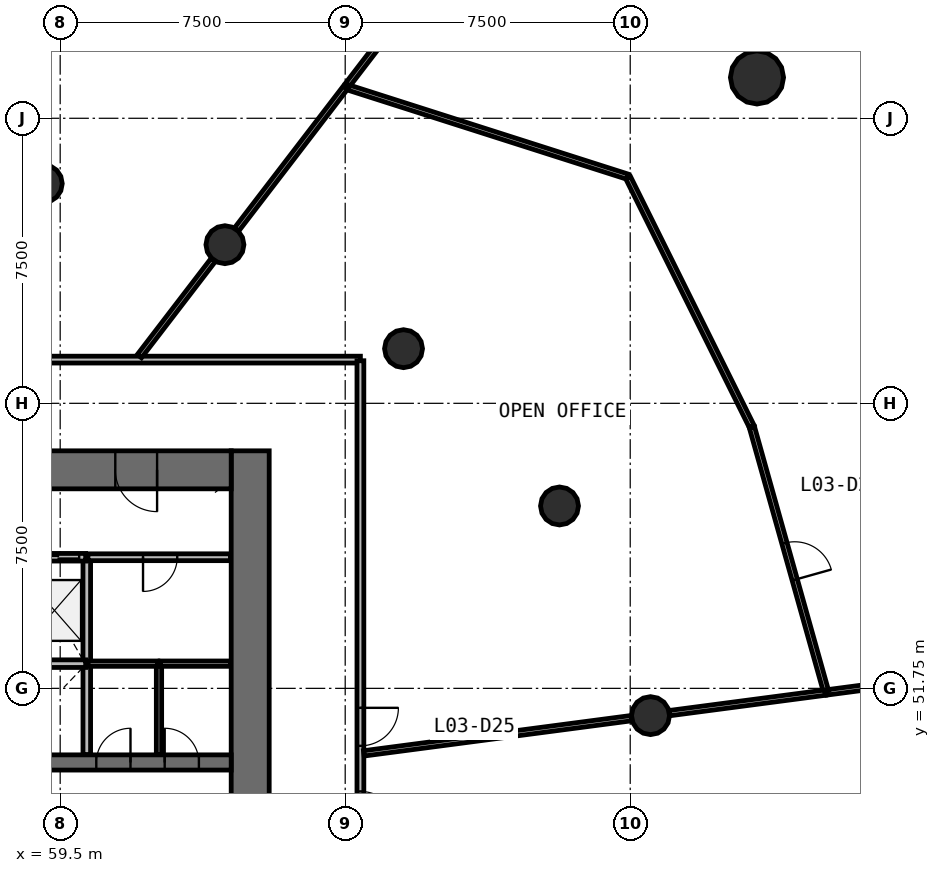
"""IFC4 building model, lengths in metres.
Left out: names, types, materials, properties, quantities, classifications, styles, units other than length and angle.
Written with IfcOpenShell. Run it as: python <this file> out.ifc"""

import sys

from ifc_helpers import new_model, si_unit, direction, frame, frame_2d, origin, origin_2d, place, context, subcontext, project, spatial, rectangle, circle, extrude, source, transform, mapped, element, fill, save


model = new_model("IFC4")
c1 = context("Model", 3, precision=1e-05, world=origin(), true_north=direction((0.0, 1.0)))
c2 = subcontext(c1, "Body", "Model", "MODEL_VIEW")
j1 = project(units=[si_unit("LENGTHUNIT", "METRE"), si_unit("PLANEANGLEUNIT", "RADIAN")], contexts=[c1])
p1 = place(None, origin())
s1 = spatial("IfcSite", under=j1, at=p1, CompositionType="ELEMENT")
p2 = place(p1, origin())
s2 = spatial("IfcBuilding", under=s1, at=p2, CompositionType="ELEMENT")
p3 = place(p2, frame((0.0, 0.0, 13.8)))
s3 = spatial("IfcBuildingStorey", under=s2, at=p3, CompositionType="ELEMENT", Elevation=13.8)
p4 = place(p3, frame((64.5, 38.0, 0.0), z_axis=(0.0, 0.0, 1.0), x_axis=(0.0, 1.0, 0.0)))
e1 = element("IfcWall", 1, at=p4, inside=s3, PredefinedType="SHEAR", context=c2, shape_type="SweptSolid", body=[
    extrude(rectangle(XDim=20.0, YDim=1.0, at=frame_2d((10.0, 0.0))), origin(), (0.0, 0.0, 1.0), 4.4),
])
p5 = place(p4, frame((9.1, 0.0, 0.0)))
e2 = element("IfcOpeningElement", 2, at=p5, cuts=e1, PredefinedType="OPENING", context=c2, shape_type="SweptSolid", body=[
    extrude(rectangle(XDim=1.8, YDim=2.1, at=frame_2d((0.9, 1.05))), frame((0.0, 0.51, 0.0), z_axis=(0.0, -1.0, 0.0), x_axis=(1.0, 0.0, 0.0)), (0.0, 0.0, 1.0), 1.02),
])
p6 = place(p3, frame((64.0, 57.5, 0.0), z_axis=(0.0, 0.0, 1.0), x_axis=(-1.0, 0.0, 0.0)))
e3 = element("IfcWall", 3, at=p6, inside=s3, PredefinedType="SHEAR", context=c2, shape_type="SweptSolid", body=[
    extrude(rectangle(XDim=24.0, YDim=1.0, at=frame_2d((12.0, 0.0))), origin(), (0.0, 0.0, 1.0), 4.4),
])
p7 = place(p6, frame((21.45, 0.0, 0.0)))
e4 = element("IfcOpeningElement", 4, at=p7, cuts=e3, PredefinedType="OPENING", context=c2, shape_type="SweptSolid", body=[
    extrude(rectangle(XDim=1.1, YDim=2.1, at=frame_2d((0.55, 1.05))), frame((0.0, 0.51, 0.0), z_axis=(0.0, -1.0, 0.0), x_axis=(1.0, 0.0, 0.0)), (0.0, 0.0, 1.0), 1.02),
])
p8 = place(p6, frame((1.95, 0.0, 0.0)))
e5 = element("IfcOpeningElement", 5, at=p8, cuts=e3, PredefinedType="OPENING", context=c2, shape_type="SweptSolid", body=[
    extrude(rectangle(XDim=1.1, YDim=2.1, at=frame_2d((0.55, 1.05))), frame((0.0, 0.51, 0.0), z_axis=(0.0, -1.0, 0.0), x_axis=(1.0, 0.0, 0.0)), (0.0, 0.0, 1.0), 1.02),
])
p9 = place(p3, frame((40.0, 49.8, 0.0), z_axis=(0.0, 0.0, 1.0), x_axis=(1.0, 0.0, 0.0)))
e6 = element("IfcWall", 6, at=p9, inside=s3, PredefinedType="SHEAR", context=c2, shape_type="SweptSolid", body=[
    extrude(rectangle(XDim=24.0, YDim=0.4, at=frame_2d((12.0, 0.0))), origin(), (0.0, 0.0, 1.0), 4.4),
])
p10 = place(p9, frame((4.5, 0.0, 0.0)))
e7 = element("IfcOpeningElement", 7, at=p10, cuts=e6, PredefinedType="OPENING", context=c2, shape_type="SweptSolid", body=[
    extrude(rectangle(XDim=1.1, YDim=2.1, at=frame_2d((0.55, 1.05))), frame((0.0, 0.21, 0.0), z_axis=(0.0, -1.0, 0.0), x_axis=(1.0, 0.0, 0.0)), (0.0, 0.0, 1.0), 0.42),
])
p11 = place(p9, frame((7.0, 0.0, 0.0)))
e8 = element("IfcOpeningElement", 8, at=p11, cuts=e6, PredefinedType="OPENING", context=c2, shape_type="SweptSolid", body=[
    extrude(rectangle(XDim=1.1, YDim=2.1, at=frame_2d((0.55, 1.05))), frame((0.0, 0.21, 0.0), z_axis=(0.0, -1.0, 0.0), x_axis=(1.0, 0.0, 0.0)), (0.0, 0.0, 1.0), 0.42),
])
p12 = place(p9, frame((9.5, 0.0, 0.0)))
e9 = element("IfcOpeningElement", 9, at=p12, cuts=e6, PredefinedType="OPENING", context=c2, shape_type="SweptSolid", body=[
    extrude(rectangle(XDim=1.1, YDim=2.1, at=frame_2d((0.55, 1.05))), frame((0.0, 0.21, 0.0), z_axis=(0.0, -1.0, 0.0), x_axis=(1.0, 0.0, 0.0)), (0.0, 0.0, 1.0), 0.42),
])
p13 = place(p9, frame((0.9, 0.0, 0.0)))
e10 = element("IfcOpeningElement", 10, at=p13, cuts=e6, PredefinedType="OPENING", context=c2, shape_type="SweptSolid", body=[
    extrude(rectangle(XDim=1.8, YDim=2.4, at=frame_2d((0.9, 1.2))), frame((0.0, 0.21, 0.0), z_axis=(0.0, -1.0, 0.0), x_axis=(1.0, 0.0, 0.0)), (0.0, 0.0, 1.0), 0.42),
])
p14 = place(p9, frame((20.45, 0.0, 0.0)))
e11 = element("IfcOpeningElement", 11, at=p14, cuts=e6, PredefinedType="OPENING", context=c2, shape_type="SweptSolid", body=[
    extrude(rectangle(XDim=0.9, YDim=2.1, at=frame_2d((0.45, 1.05))), frame((0.0, 0.21, 0.0), z_axis=(0.0, -1.0, 0.0), x_axis=(1.0, 0.0, 0.0)), (0.0, 0.0, 1.0), 0.42),
])
p15 = place(p9, frame((22.25, 0.0, 0.0)))
e12 = element("IfcOpeningElement", 12, at=p15, cuts=e6, PredefinedType="OPENING", context=c2, shape_type="SweptSolid", body=[
    extrude(rectangle(XDim=0.9, YDim=2.1, at=frame_2d((0.45, 1.05))), frame((0.0, 0.21, 0.0), z_axis=(0.0, -1.0, 0.0), x_axis=(1.0, 0.0, 0.0)), (0.0, 0.0, 1.0), 0.42),
])
p16 = place(p9, frame((11.65, 0.0, 0.0)))
e13 = element("IfcOpeningElement", 13, at=p16, cuts=e6, PredefinedType="OPENING", context=c2, shape_type="SweptSolid", body=[
    extrude(rectangle(XDim=0.9, YDim=2.1, at=frame_2d((0.45, 1.05))), frame((0.0, 0.21, 0.0), z_axis=(0.0, -1.0, 0.0), x_axis=(1.0, 0.0, 0.0)), (0.0, 0.0, 1.0), 0.42),
])
m1 = source(origin(), c2, "Body", "SweptSolid", [
    extrude(circle(Radius=0.7, at=origin_2d()), origin(), (0.0, 0.0, 1.0), 4.4),
])
p17 = place(p3, frame((77.836, 67.824, 0.0), z_axis=(0.0, 0.0, 1.0), x_axis=(1.0, 0.0, 0.0)))
e14 = element("IfcColumn", 14, at=p17, inside=s3, PredefinedType="COLUMN", context=c2, shape_type="MappedRepresentation", body=[
    mapped(m1, transform((0.0, 0.0, 0.0), scale=1.0)),
])
m2 = source(origin(), c2, "Body", "SweptSolid", [
    extrude(circle(Radius=0.5, at=origin_2d()), origin(), (0.0, 0.0, 1.0), 4.4),
])
for number, where, z_axis, x_axis in (
    (15, (75.034, 51.032, 0.0), (0.0, 0.0, 1.0), (1.0, 0.0, 0.0)),
    (16, (72.639, 56.549, 0.0), (0.0, 0.0, 1.0), (1.0, 0.0, 0.0)),
    (17, (68.535, 60.688, 0.0), (0.0, 0.0, 1.0), (1.0, 0.0, 0.0)),
    (18, (63.835, 63.424, 0.0), (0.0, 0.0, 1.0), (1.0, 0.0, 0.0)),
    (19, (59.055, 65.031, 0.0), (0.0, 0.0, 1.0), (1.0, 0.0, 0.0)),
):
    element("IfcColumn", number, at=place(p3, frame(where, z_axis=z_axis, x_axis=x_axis)), inside=s3, PredefinedType="COLUMN", context=c2, shape_type="MappedRepresentation", body=[
        mapped(m2, transform((0.0, 0.0, 0.0), scale=1.0)),
    ])
p18 = place(p3, frame((60.2, 52.4, 0.0), z_axis=(0.0, 0.0, 1.0), x_axis=(0.0, 1.0, 0.0)))
e20 = element("IfcWall", 20, at=p18, inside=s3, PredefinedType="SOLIDWALL", context=c2, shape_type="SweptSolid", body=[
    extrude(rectangle(XDim=2.8, YDim=0.2, at=frame_2d((1.4, 0.0))), origin(), (0.0, 0.0, 1.0), 4.05),
])
p19 = place(p3, frame((60.2, 50.01, 0.0), z_axis=(0.0, 0.0, 1.0), x_axis=(0.0, 1.0, 0.0)))
e21 = element("IfcWall", 21, at=p19, inside=s3, PredefinedType="SOLIDWALL", context=c2, shape_type="SweptSolid", body=[
    extrude(rectangle(XDim=2.36, YDim=0.2, at=frame_2d((1.18, 0.0))), origin(), (0.0, 0.0, 1.0), 4.05),
])
p20 = place(p3, frame((60.17, 52.4, 0.0), z_axis=(0.0, 0.0, 1.0), x_axis=(-1.0, 0.0, 0.0)))
e22 = element("IfcWall", 22, at=p20, inside=s3, PredefinedType="SOLIDWALL", context=c2, shape_type="SweptSolid", body=[
    extrude(rectangle(XDim=1.64, YDim=0.2, at=frame_2d((0.82, 0.0))), origin(), (0.0, 0.0, 1.0), 4.05),
])
p21 = place(p3, frame((60.17, 55.2, 0.0), z_axis=(0.0, 0.0, 1.0), x_axis=(-1.0, 0.0, 0.0)))
e23 = element("IfcWall", 23, at=p21, inside=s3, PredefinedType="SOLIDWALL", context=c2, shape_type="SweptSolid", body=[
    extrude(rectangle(XDim=1.64, YDim=0.2, at=frame_2d((0.82, 0.0))), origin(), (0.0, 0.0, 1.0), 4.05),
])
p22 = place(p21, frame((0.17, 0.0, 0.0)))
e24 = element("IfcOpeningElement", 24, at=p22, cuts=e23, PredefinedType="OPENING", context=c2, shape_type="SweptSolid", body=[
    extrude(rectangle(XDim=1.1, YDim=2.1, at=frame_2d((0.55, 1.05))), frame((0.0, 0.11, 0.0), z_axis=(0.0, -1.0, 0.0), x_axis=(1.0, 0.0, 0.0)), (0.0, 0.0, 1.0), 0.22),
])
p23 = place(p3, frame((36.6, 60.4, 0.0), z_axis=(0.0, 0.0, 1.0), x_axis=(1.0, 0.0, 0.0)))
e25 = element("IfcWall", 25, at=p23, inside=s3, PredefinedType="PARTITIONING", context=c2, shape_type="SweptSolid", body=[
    extrude(rectangle(XDim=30.8, YDim=0.18, at=frame_2d((15.4, 0.0))), origin(), (0.0, 0.0, 1.0), 3.25),
])
p24 = place(p23, frame((17.35, 0.0, 0.0)))
e26 = element("IfcOpeningElement", 26, at=p24, cuts=e25, PredefinedType="OPENING", context=c2, shape_type="SweptSolid", body=[
    extrude(rectangle(XDim=1.0, YDim=2.1, at=frame_2d((0.5, 1.05))), frame((0.0, 0.1, 0.0), z_axis=(0.0, -1.0, 0.0), x_axis=(1.0, 0.0, 0.0)), (0.0, 0.0, 1.0), 0.2),
])
p25 = place(p23, frame((14.85, 0.0, 0.0)))
e27 = element("IfcOpeningElement", 27, at=p25, cuts=e25, PredefinedType="OPENING", context=c2, shape_type="SweptSolid", body=[
    extrude(rectangle(XDim=0.9, YDim=2.1, at=frame_2d((0.45, 1.05))), frame((0.0, 0.1, 0.0), z_axis=(0.0, -1.0, 0.0), x_axis=(1.0, 0.0, 0.0)), (0.0, 0.0, 1.0), 0.2),
])
p26 = place(p23, frame((12.65, 0.0, 0.0)))
e28 = element("IfcOpeningElement", 28, at=p26, cuts=e25, PredefinedType="OPENING", context=c2, shape_type="SweptSolid", body=[
    extrude(rectangle(XDim=0.9, YDim=2.1, at=frame_2d((0.45, 1.05))), frame((0.0, 0.1, 0.0), z_axis=(0.0, -1.0, 0.0), x_axis=(1.0, 0.0, 0.0)), (0.0, 0.0, 1.0), 0.2),
])
p27 = place(p23, frame((8.95, 0.0, 0.0)))
e29 = element("IfcOpeningElement", 29, at=p27, cuts=e25, PredefinedType="OPENING", context=c2, shape_type="SweptSolid", body=[
    extrude(rectangle(XDim=1.0, YDim=2.1, at=frame_2d((0.5, 1.05))), frame((0.0, 0.1, 0.0), z_axis=(0.0, -1.0, 0.0), x_axis=(1.0, 0.0, 0.0)), (0.0, 0.0, 1.0), 0.2),
])
p28 = place(p3, frame((67.4, 60.37, 0.0), z_axis=(0.0, 0.0, 1.0), x_axis=(0.0, -1.0, 0.0)))
e30 = element("IfcWall", 30, at=p28, inside=s3, PredefinedType="PARTITIONING", context=c2, shape_type="SweptSolid", body=[
    extrude(rectangle(XDim=23.583, YDim=0.18, at=frame_2d((11.791, 0.0))), origin(), (0.0, 0.0, 1.0), 3.25),
])
p29 = place(p28, frame((11.333, 0.0, 0.0)))
e31 = element("IfcOpeningElement", 31, at=p29, cuts=e30, PredefinedType="OPENING", context=c2, shape_type="SweptSolid", body=[
    extrude(rectangle(XDim=1.0, YDim=2.1, at=frame_2d((0.5, 1.05))), frame((0.0, 0.1, 0.0), z_axis=(0.0, -1.0, 0.0), x_axis=(1.0, 0.0, 0.0)), (0.0, 0.0, 1.0), 0.2),
])
p30 = place(p28, frame((9.133, 0.0, 0.0)))
e32 = element("IfcOpeningElement", 32, at=p30, cuts=e30, PredefinedType="OPENING", context=c2, shape_type="SweptSolid", body=[
    extrude(rectangle(XDim=1.0, YDim=2.1, at=frame_2d((0.5, 1.05))), frame((0.0, 0.1, 0.0), z_axis=(0.0, -1.0, 0.0), x_axis=(1.0, 0.0, 0.0)), (0.0, 0.0, 1.0), 0.2),
])
p31 = place(p28, frame((19.133, 0.0, 0.0)))
e33 = element("IfcOpeningElement", 33, at=p31, cuts=e30, PredefinedType="OPENING", context=c2, shape_type="SweptSolid", body=[
    extrude(rectangle(XDim=1.0, YDim=2.1, at=frame_2d((0.5, 1.05))), frame((0.0, 0.1, 0.0), z_axis=(0.0, -1.0, 0.0), x_axis=(1.0, 0.0, 0.0)), (0.0, 0.0, 1.0), 0.2),
])
p32 = place(p3, frame((63.98, 55.2, 0.0), z_axis=(0.0, 0.0, 1.0), x_axis=(-1.0, 0.0, 0.0)))
e34 = element("IfcWall", 34, at=p32, inside=s3, PredefinedType="PARTITIONING", context=c2, shape_type="SweptSolid", body=[
    extrude(rectangle(XDim=3.75, YDim=0.18, at=frame_2d((1.875, 0.0))), origin(), (0.0, 0.0, 1.0), 4.05),
])
p33 = place(p32, frame((1.4, 0.0, 0.0)))
e35 = element("IfcOpeningElement", 35, at=p33, cuts=e34, PredefinedType="OPENING", context=c2, shape_type="SweptSolid", body=[
    extrude(rectangle(XDim=0.9, YDim=2.1, at=frame_2d((0.45, 1.05))), frame((0.0, 0.1, 0.0), z_axis=(0.0, -1.0, 0.0), x_axis=(1.0, 0.0, 0.0)), (0.0, 0.0, 1.0), 0.2),
])
p34 = place(p3, frame((74.432, 65.213, 0.0), z_axis=(0.0, 0.0, 1.0), x_axis=(-0.952603673554, 0.304214136967, 0.0)))
e36 = element("IfcWall", 36, at=p34, inside=s3, PredefinedType="PARTITIONING", context=c2, shape_type="SweptSolid", body=[
    extrude(rectangle(XDim=7.777, YDim=0.14, at=frame_2d((3.889, 0.0))), origin(), (0.0, 0.0, 1.0), 3.25),
])
p35 = place(p3, frame((79.66, 51.642, 0.0), z_axis=(0.0, 0.0, 1.0), x_axis=(0.991446737275, 0.130511942543, 0.0)))
e37 = element("IfcWall", 37, at=p35, inside=s3, PredefinedType="PARTITIONING", context=c2, shape_type="SweptSolid", body=[
    extrude(rectangle(XDim=7.698, YDim=0.14, at=frame_2d((3.849, 0.0))), origin(), (0.0, 0.0, 1.0), 3.25),
])
p36 = place(p3, frame((77.696, 58.644, 0.0), z_axis=(0.0, 0.0, 1.0), x_axis=(-0.444912861123, 0.895573864071, 0.0)))
e38 = element("IfcWall", 38, at=p36, inside=s3, PredefinedType="PARTITIONING", context=c2, shape_type="SweptSolid", body=[
    extrude(rectangle(XDim=7.305, YDim=0.14, at=frame_2d((3.653, 0.0))), origin(), (0.0, 0.0, 1.0), 3.25),
])
p37 = place(p3, frame((77.704, 58.615, 0.0), z_axis=(0.0, 0.0, 1.0), x_axis=(0.27015344918, -0.9628172796, 0.0)))
e39 = element("IfcWall", 39, at=p37, inside=s3, PredefinedType="PARTITIONING", context=c2, shape_type="SweptSolid", body=[
    extrude(rectangle(XDim=7.212, YDim=0.14, at=frame_2d((3.606, 0.0))), origin(), (0.0, 0.0, 1.0), 3.25),
])
p38 = place(p37, frame((3.163, 0.0, 0.0)))
e40 = element("IfcOpeningElement", 40, at=p38, cuts=e39, PredefinedType="OPENING", context=c2, shape_type="SweptSolid", body=[
    extrude(rectangle(XDim=1.0, YDim=2.1, at=frame_2d((0.5, 1.05))), frame((0.0, 0.08, 0.0), z_axis=(0.0, -1.0, 0.0), x_axis=(1.0, 0.0, 0.0)), (0.0, 0.0, 1.0), 0.16),
])
p39 = place(p3, frame((67.49, 50.039, 0.0), z_axis=(0.0, 0.0, 1.0), x_axis=(0.99144622305, 0.130515848849, 0.0)))
e41 = element("IfcWall", 41, at=p39, inside=s3, PredefinedType="PARTITIONING", context=c2, shape_type="SweptSolid", body=[
    extrude(rectangle(XDim=7.104, YDim=0.14, at=frame_2d((3.552, 0.0))), origin(), (0.0, 0.0, 1.0), 3.25),
])
p40 = place(p3, frame((67.069, 67.638, 0.0), z_axis=(0.0, 0.0, 1.0), x_axis=(0.608784649219, 0.793335522258, 0.0)))
e42 = element("IfcWall", 42, at=p40, inside=s3, PredefinedType="PARTITIONING", context=c2, shape_type="SweptSolid", body=[
    extrude(rectangle(XDim=4.92, YDim=0.14, at=frame_2d((2.46, 0.0))), origin(), (0.0, 0.0, 1.0), 3.25),
])
p41 = place(p3, frame((64.142, 63.824, 0.0), z_axis=(0.0, 0.0, 1.0), x_axis=(0.608759522286, 0.793354803368, 0.0)))
e43 = element("IfcWall", 43, at=p41, inside=s3, PredefinedType="PARTITIONING", context=c2, shape_type="SweptSolid", body=[
    extrude(rectangle(XDim=4.703, YDim=0.14, at=frame_2d((2.352, 0.0))), origin(), (0.0, 0.0, 1.0), 3.25),
])
p42 = place(p3, frame((75.534, 51.098, 0.0), z_axis=(0.0, 0.0, 1.0), x_axis=(0.99144685344, 0.130511060083, 0.0)))
e44 = element("IfcWall", 44, at=p42, inside=s3, PredefinedType="PARTITIONING", context=c2, shape_type="SweptSolid", body=[
    extrude(rectangle(XDim=4.132, YDim=0.14, at=frame_2d((2.066, 0.0))), origin(), (0.0, 0.0, 1.0), 3.25),
])
p43 = place(p3, frame((61.584, 60.49, 0.0), z_axis=(0.0, 0.0, 1.0), x_axis=(0.60874605662, 0.793365135703, 0.0)))
e45 = element("IfcWall", 45, at=p43, inside=s3, PredefinedType="PARTITIONING", context=c2, shape_type="SweptSolid", body=[
    extrude(rectangle(XDim=3.194, YDim=0.14, at=frame_2d((1.597, 0.0))), origin(), (0.0, 0.0, 1.0), 3.25),
])
p44 = place(p3, frame((62.1, 50.01, 0.0), z_axis=(0.0, 0.0, 1.0), x_axis=(0.0, 1.0, 0.0)))
e46 = element("IfcWall", 46, at=p44, inside=s3, PredefinedType="PARTITIONING", context=c2, shape_type="SweptSolid", body=[
    extrude(rectangle(XDim=2.39, YDim=0.14, at=frame_2d((1.195, 0.0))), origin(), (0.0, 0.0, 1.0), 3.25),
])
p45 = place(p3, frame((62.07, 52.4, 0.0), z_axis=(0.0, 0.0, 1.0), x_axis=(-1.0, 0.0, 0.0)))
e47 = element("IfcWall", 47, at=p45, inside=s3, PredefinedType="PARTITIONING", context=c2, shape_type="SweptSolid", body=[
    extrude(rectangle(XDim=1.84, YDim=0.14, at=frame_2d((0.92, 0.0))), origin(), (0.0, 0.0, 1.0), 3.25),
])
p46 = place(p3, frame((63.98, 52.4, 0.0), z_axis=(0.0, 0.0, 1.0), x_axis=(-1.0, 0.0, 0.0)))
e48 = element("IfcWall", 48, at=p46, inside=s3, PredefinedType="PARTITIONING", context=c2, shape_type="SweptSolid", body=[
    extrude(rectangle(XDim=1.85, YDim=0.14, at=frame_2d((0.925, 0.0))), origin(), (0.0, 0.0, 1.0), 3.25),
])
m3 = source(origin(), c2, "Body", "SweptSolid", [
    extrude(rectangle(XDim=1.1, YDim=2.1, at=frame_2d((0.55, 1.05))), frame((0.0, 0.025, 0.0), z_axis=(0.0, -1.0, 0.0), x_axis=(1.0, 0.0, 0.0)), (0.0, 0.0, 1.0), 0.05),
])
p47 = place(p22, origin())
e49 = element("IfcDoor", 49, at=p47, inside=s3, OperationType="DOUBLE_DOOR_SLIDING", PredefinedType="USERDEFINED", context=c2, shape_type="MappedRepresentation", body=[
    mapped(m3, transform((0.0, 0.0, 0.0), scale=1.0)),
])
fill(e24, e49)
m4 = source(origin(), c2, "Body", "SweptSolid", [
    extrude(rectangle(XDim=1.1, YDim=2.1, at=frame_2d((0.55, 1.05))), frame((0.0, 0.025, 0.0), z_axis=(0.0, -1.0, 0.0), x_axis=(1.0, 0.0, 0.0)), (0.0, 0.0, 1.0), 0.05),
])
p48 = place(p8, origin())
e50 = element("IfcDoor", 50, at=p48, inside=s3, OperationType="SINGLE_SWING_LEFT", PredefinedType="DOOR", context=c2, shape_type="MappedRepresentation", body=[
    mapped(m4, transform((0.0, 0.0, 0.0), scale=1.0)),
])
fill(e5, e50)
m5 = source(origin(), c2, "Body", "SweptSolid", [
    extrude(rectangle(XDim=1.0, YDim=2.1, at=frame_2d((0.5, 1.05))), frame((0.0, 0.025, 0.0), z_axis=(0.0, -1.0, 0.0), x_axis=(1.0, 0.0, 0.0)), (0.0, 0.0, 1.0), 0.05),
])
p49 = place(p29, origin())
e51 = element("IfcDoor", 51, at=p49, inside=s3, OperationType="SINGLE_SWING_RIGHT", PredefinedType="DOOR", context=c2, shape_type="MappedRepresentation", body=[
    mapped(m5, transform((0.0, 0.0, 0.0), scale=1.0)),
])
fill(e31, e51)
p50 = place(p30, origin())
e52 = element("IfcDoor", 52, at=p50, inside=s3, OperationType="SINGLE_SWING_LEFT", PredefinedType="DOOR", context=c2, shape_type="MappedRepresentation", body=[
    mapped(m5, transform((0.0, 0.0, 0.0), scale=1.0)),
])
fill(e32, e52)
p51 = place(p38, origin())
e53 = element("IfcDoor", 53, at=p51, inside=s3, OperationType="SINGLE_SWING_RIGHT", PredefinedType="DOOR", context=c2, shape_type="MappedRepresentation", body=[
    mapped(m5, transform((0.0, 0.0, 0.0), scale=1.0)),
])
fill(e40, e53)
m6 = source(origin(), c2, "Body", "SweptSolid", [
    extrude(rectangle(XDim=0.9, YDim=2.1, at=frame_2d((0.45, 1.05))), frame((0.0, 0.025, 0.0), z_axis=(0.0, -1.0, 0.0), x_axis=(1.0, 0.0, 0.0)), (0.0, 0.0, 1.0), 0.05),
])
p52 = place(p14, origin())
e54 = element("IfcDoor", 54, at=p52, inside=s3, OperationType="SINGLE_SWING_RIGHT", PredefinedType="DOOR", context=c2, shape_type="MappedRepresentation", body=[
    mapped(m6, transform((0.0, 0.0, 0.0), scale=1.0)),
])
fill(e11, e54)
p53 = place(p15, origin())
e55 = element("IfcDoor", 55, at=p53, inside=s3, OperationType="SINGLE_SWING_LEFT", PredefinedType="DOOR", context=c2, shape_type="MappedRepresentation", body=[
    mapped(m6, transform((0.0, 0.0, 0.0), scale=1.0)),
])
fill(e12, e55)
p54 = place(p33, origin())
e56 = element("IfcDoor", 56, at=p54, inside=s3, OperationType="SINGLE_SWING_RIGHT", PredefinedType="DOOR", context=c2, shape_type="MappedRepresentation", body=[
    mapped(m6, transform((0.0, 0.0, 0.0), scale=1.0)),
])
fill(e35, e56)
save(model, sys.argv[1])
